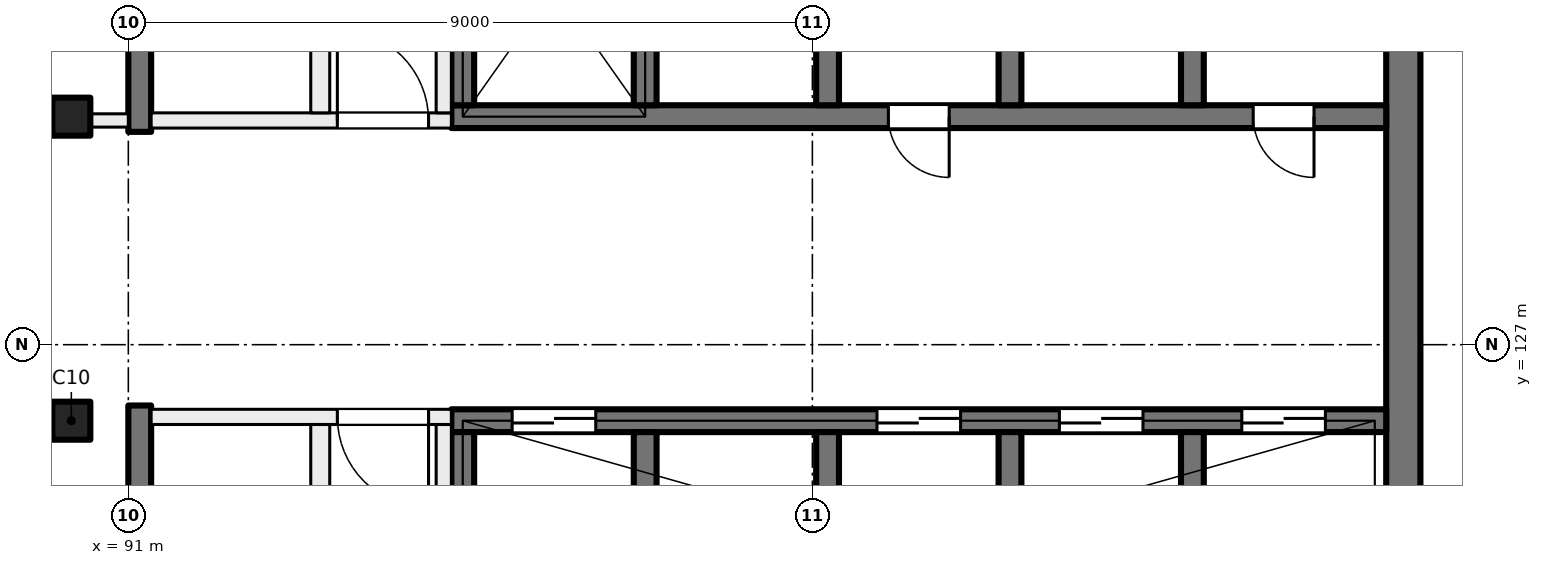
"""IFC4 building model, lengths in metres.
Left out: names, types, materials, properties, quantities, classifications, styles, units other than length and angle.
Written with IfcOpenShell. Run it as: python <this file> out.ifc"""

import sys

from ifc_helpers import new_model, si_unit, direction, frame, frame_2d, origin, origin_2d, place, context, subcontext, project, spatial, rectangle, extrude, element, fill, save


model = new_model("IFC4")
c1 = context("Model", 3, precision=1e-05, world=origin(), true_north=direction((0.0, 1.0)))
c2 = subcontext(c1, "Body", "Model", "MODEL_VIEW")
j1 = project(units=[si_unit("LENGTHUNIT", "METRE"), si_unit("PLANEANGLEUNIT", "RADIAN")], contexts=[c1])
p1 = place(None, origin())
s1 = spatial("IfcSite", under=j1, at=p1, CompositionType="ELEMENT")
p2 = place(p1, origin())
s2 = spatial("IfcBuilding", under=s1, at=p2, CompositionType="ELEMENT")
p3 = place(p2, frame((0.0, 0.0, 269.5)))
s3 = spatial("IfcBuildingStorey", under=s2, at=p3, CompositionType="ELEMENT", Elevation=269.5)
for number, where, z_axis, x_axis in (
    (1, (90.25, 130.0, 0.0), (0.0, 0.0, 1.0), (1.0, 0.0, 0.0)),
    (2, (90.25, 126.0, 0.0), (0.0, 0.0, 1.0), (1.0, 0.0, 0.0)),
):
    element("IfcColumn", number, at=place(p3, frame(where, z_axis=z_axis, x_axis=x_axis)), inside=s3, PredefinedType="COLUMN", context=c2, shape_type="SweptSolid", body=[
        extrude(rectangle(XDim=0.5, YDim=0.5, at=origin_2d()), origin(), (0.0, 0.0, 1.0), 4.0),
    ])
p4 = place(p3, frame((107.775, 135.2, 0.0), z_axis=(0.0, 0.0, 1.0), x_axis=(0.0, -1.0, 0.0)))
e3 = element("IfcWall", 3, at=p4, inside=s3, PredefinedType="SHEAR", context=c2, shape_type="SweptSolid", body=[
    extrude(rectangle(XDim=14.4, YDim=0.45, at=frame_2d((7.2, 0.0))), origin(), (0.0, 0.0, 1.0), 4.0),
])
p5 = place(p3, frame((107.55, 130.0, 0.0), z_axis=(0.0, 0.0, 1.0), x_axis=(-1.0, 0.0, 0.0)))
e4 = element("IfcWall", 4, at=p5, inside=s3, PredefinedType="SHEAR", context=c2, shape_type="SweptSolid", body=[
    extrude(rectangle(XDim=12.3, YDim=0.3, at=frame_2d((6.15, 0.0))), origin(), (0.0, 0.0, 1.0), 4.0),
])
p6 = place(p5, frame((0.95, 0.0, 0.0)))
e5 = element("IfcOpeningElement", 5, at=p6, cuts=e4, PredefinedType="OPENING", context=c2, shape_type="SweptSolid", body=[
    extrude(rectangle(XDim=0.8, YDim=2.1, at=frame_2d((0.4, 1.05))), frame((0.0, 0.16, 0.0), z_axis=(0.0, -1.0, 0.0), x_axis=(1.0, 0.0, 0.0)), (0.0, 0.0, 1.0), 0.32),
])
p7 = place(p5, frame((5.75, 0.0, 0.0)))
e6 = element("IfcOpeningElement", 6, at=p7, cuts=e4, PredefinedType="OPENING", context=c2, shape_type="SweptSolid", body=[
    extrude(rectangle(XDim=0.8, YDim=2.1, at=frame_2d((0.4, 1.05))), frame((0.0, 0.16, 0.0), z_axis=(0.0, -1.0, 0.0), x_axis=(1.0, 0.0, 0.0)), (0.0, 0.0, 1.0), 0.32),
])
for number, where, z_axis, x_axis in (
    (7, (105.0, 133.25, 0.0), (0.0, 0.0, 1.0), (0.0, -1.0, 0.0)),
    (8, (102.6, 133.25, 0.0), (0.0, 0.0, 1.0), (0.0, -1.0, 0.0)),
    (9, (100.2, 133.25, 0.0), (0.0, 0.0, 1.0), (0.0, -1.0, 0.0)),
    (10, (97.8, 133.25, 0.0), (0.0, 0.0, 1.0), (0.0, -1.0, 0.0)),
    (11, (95.4, 133.25, 0.0), (0.0, 0.0, 1.0), (0.0, -1.0, 0.0)),
):
    element("IfcWall", number, at=place(p3, frame(where, z_axis=z_axis, x_axis=x_axis)), inside=s3, PredefinedType="SHEAR", context=c2, shape_type="SweptSolid", body=[
        extrude(rectangle(XDim=3.1, YDim=0.3, at=frame_2d((1.55, 0.0))), origin(), (0.0, 0.0, 1.0), 4.0),
    ])
p8 = place(p3, frame((107.55, 126.0, 0.0), z_axis=(0.0, 0.0, 1.0), x_axis=(-1.0, 0.0, 0.0)))
e12 = element("IfcWall", 12, at=p8, inside=s3, PredefinedType="SHEAR", context=c2, shape_type="SweptSolid", body=[
    extrude(rectangle(XDim=12.3, YDim=0.3, at=frame_2d((6.15, 0.0))), origin(), (0.0, 0.0, 1.0), 4.0),
])
p9 = place(p8, frame((0.8, 0.0, 0.0)))
e13 = element("IfcOpeningElement", 13, at=p9, cuts=e12, PredefinedType="OPENING", context=c2, shape_type="SweptSolid", body=[
    extrude(rectangle(XDim=1.1, YDim=2.1, at=frame_2d((0.55, 1.05))), frame((0.0, 0.16, 0.0), z_axis=(0.0, -1.0, 0.0), x_axis=(1.0, 0.0, 0.0)), (0.0, 0.0, 1.0), 0.32),
])
p10 = place(p8, frame((3.2, 0.0, 0.0)))
e14 = element("IfcOpeningElement", 14, at=p10, cuts=e12, PredefinedType="OPENING", context=c2, shape_type="SweptSolid", body=[
    extrude(rectangle(XDim=1.1, YDim=2.1, at=frame_2d((0.55, 1.05))), frame((0.0, 0.16, 0.0), z_axis=(0.0, -1.0, 0.0), x_axis=(1.0, 0.0, 0.0)), (0.0, 0.0, 1.0), 0.32),
])
p11 = place(p8, frame((5.6, 0.0, 0.0)))
e15 = element("IfcOpeningElement", 15, at=p11, cuts=e12, PredefinedType="OPENING", context=c2, shape_type="SweptSolid", body=[
    extrude(rectangle(XDim=1.1, YDim=2.1, at=frame_2d((0.55, 1.05))), frame((0.0, 0.16, 0.0), z_axis=(0.0, -1.0, 0.0), x_axis=(1.0, 0.0, 0.0)), (0.0, 0.0, 1.0), 0.32),
])
p12 = place(p8, frame((10.4, 0.0, 0.0)))
e16 = element("IfcOpeningElement", 16, at=p12, cuts=e12, PredefinedType="OPENING", context=c2, shape_type="SweptSolid", body=[
    extrude(rectangle(XDim=1.1, YDim=2.1, at=frame_2d((0.55, 1.05))), frame((0.0, 0.16, 0.0), z_axis=(0.0, -1.0, 0.0), x_axis=(1.0, 0.0, 0.0)), (0.0, 0.0, 1.0), 0.32),
])
for number, where, z_axis, x_axis in (
    (17, (105.0, 125.85, 0.0), (0.0, 0.0, 1.0), (0.0, -1.0, 0.0)),
    (18, (102.6, 125.85, 0.0), (0.0, 0.0, 1.0), (0.0, -1.0, 0.0)),
    (19, (100.2, 125.85, 0.0), (0.0, 0.0, 1.0), (0.0, -1.0, 0.0)),
    (20, (97.8, 125.85, 0.0), (0.0, 0.0, 1.0), (0.0, -1.0, 0.0)),
    (21, (95.4, 125.85, 0.0), (0.0, 0.0, 1.0), (0.0, -1.0, 0.0)),
):
    element("IfcWall", number, at=place(p3, frame(where, z_axis=z_axis, x_axis=x_axis)), inside=s3, PredefinedType="SHEAR", context=c2, shape_type="SweptSolid", body=[
        extrude(rectangle(XDim=3.1, YDim=0.3, at=frame_2d((1.55, 0.0))), origin(), (0.0, 0.0, 1.0), 4.0),
    ])
for number, where, z_axis, x_axis in (
    (22, (91.15, 138.55, 0.0), (0.0, 0.0, 1.0), (0.0, -1.0, 0.0)),
    (23, (91.15, 126.2, 0.0), (0.0, 0.0, 1.0), (0.0, -1.0, 0.0)),
):
    element("IfcWall", number, at=place(p3, frame(where, z_axis=z_axis, x_axis=x_axis)), inside=s3, PredefinedType="SHEAR", context=c2, shape_type="SweptSolid", body=[
        extrude(rectangle(XDim=8.75, YDim=0.3, at=frame_2d((4.375, 0.0))), origin(), (0.0, 0.0, 1.0), 4.0),
    ])
p13 = place(p3, frame((95.25, 126.05, 0.0), z_axis=(0.0, 0.0, 1.0), x_axis=(-1.0, 0.0, 0.0)))
e24 = element("IfcWall", 24, at=p13, inside=s3, PredefinedType="PARTITIONING", context=c2, shape_type="SweptSolid", body=[
    extrude(rectangle(XDim=3.95, YDim=0.2, at=frame_2d((1.975, 0.0))), origin(), (0.0, 0.0, 1.0), 3.625),
])
p14 = place(p13, frame((0.3, 0.0, 0.0)))
e25 = element("IfcOpeningElement", 25, at=p14, cuts=e24, PredefinedType="OPENING", context=c2, shape_type="SweptSolid", body=[
    extrude(rectangle(XDim=1.2, YDim=2.1, at=frame_2d((0.6, 1.05))), frame((0.0, 0.11, 0.0), z_axis=(0.0, -1.0, 0.0), x_axis=(1.0, 0.0, 0.0)), (0.0, 0.0, 1.0), 0.22),
])
p15 = place(p3, frame((95.15, 117.45, 0.0), z_axis=(0.0, 0.0, 1.0), x_axis=(0.0, 1.0, 0.0)))
e26 = element("IfcWall", 26, at=p15, inside=s3, PredefinedType="PARTITIONING", context=c2, shape_type="SweptSolid", body=[
    extrude(rectangle(XDim=8.5, YDim=0.2, at=frame_2d((4.25, 0.0))), origin(), (0.0, 0.0, 1.0), 3.625),
])
p16 = place(p15, frame((1.75, 0.0, 0.0)))
e27 = element("IfcOpeningElement", 27, at=p16, cuts=e26, PredefinedType="OPENING", context=c2, shape_type="SweptSolid", body=[
    extrude(rectangle(XDim=1.5, YDim=2.1, at=frame_2d((0.75, 1.05))), frame((0.0, 0.11, 0.0), z_axis=(0.0, -1.0, 0.0), x_axis=(1.0, 0.0, 0.0)), (0.0, 0.0, 1.0), 0.22),
])
p17 = place(p3, frame((93.525, 117.45, 0.0), z_axis=(0.0, 0.0, 1.0), x_axis=(0.0, 1.0, 0.0)))
e28 = element("IfcWall", 28, at=p17, inside=s3, PredefinedType="PARTITIONING", context=c2, shape_type="SweptSolid", body=[
    extrude(rectangle(XDim=8.5, YDim=0.25, at=frame_2d((4.25, 0.0))), origin(), (0.0, 0.0, 1.0), 3.625),
])
p18 = place(p17, frame((6.0, 0.0, 0.0)))
e29 = element("IfcOpeningElement", 29, at=p18, cuts=e28, PredefinedType="OPENING", context=c2, shape_type="SweptSolid", body=[
    extrude(rectangle(XDim=0.8, YDim=2.1, at=frame_2d((0.4, 1.05))), frame((0.0, 0.135, 0.0), z_axis=(0.0, -1.0, 0.0), x_axis=(1.0, 0.0, 0.0)), (0.0, 0.0, 1.0), 0.27),
])
p19 = place(p17, frame((1.7, 0.0, 0.0)))
e30 = element("IfcOpeningElement", 30, at=p19, cuts=e28, PredefinedType="OPENING", context=c2, shape_type="SweptSolid", body=[
    extrude(rectangle(XDim=0.8, YDim=2.1, at=frame_2d((0.4, 1.05))), frame((0.0, 0.135, 0.0), z_axis=(0.0, -1.0, 0.0), x_axis=(1.0, 0.0, 0.0)), (0.0, 0.0, 1.0), 0.27),
])
p20 = place(p3, frame((91.3, 129.95, 0.0), z_axis=(0.0, 0.0, 1.0), x_axis=(1.0, 0.0, 0.0)))
e31 = element("IfcWall", 31, at=p20, inside=s3, PredefinedType="PARTITIONING", context=c2, shape_type="SweptSolid", body=[
    extrude(rectangle(XDim=3.95, YDim=0.2, at=frame_2d((1.975, 0.0))), origin(), (0.0, 0.0, 1.0), 3.625),
])
p21 = place(p20, frame((2.45, 0.0, 0.0)))
e32 = element("IfcOpeningElement", 32, at=p21, cuts=e31, PredefinedType="OPENING", context=c2, shape_type="SweptSolid", body=[
    extrude(rectangle(XDim=1.2, YDim=2.1, at=frame_2d((0.6, 1.05))), frame((0.0, 0.11, 0.0), z_axis=(0.0, -1.0, 0.0), x_axis=(1.0, 0.0, 0.0)), (0.0, 0.0, 1.0), 0.22),
])
p22 = place(p3, frame((95.15, 130.05, 0.0), z_axis=(0.0, 0.0, 1.0), x_axis=(0.0, 1.0, 0.0)))
e33 = element("IfcWall", 33, at=p22, inside=s3, PredefinedType="PARTITIONING", context=c2, shape_type="SweptSolid", body=[
    extrude(rectangle(XDim=8.5, YDim=0.2, at=frame_2d((4.25, 0.0))), origin(), (0.0, 0.0, 1.0), 3.625),
])
p23 = place(p22, frame((5.25, 0.0, 0.0)))
e34 = element("IfcOpeningElement", 34, at=p23, cuts=e33, PredefinedType="OPENING", context=c2, shape_type="SweptSolid", body=[
    extrude(rectangle(XDim=1.5, YDim=2.1, at=frame_2d((0.75, 1.05))), frame((0.0, 0.11, 0.0), z_axis=(0.0, -1.0, 0.0), x_axis=(1.0, 0.0, 0.0)), (0.0, 0.0, 1.0), 0.22),
])
p24 = place(p3, frame((93.525, 130.05, 0.0), z_axis=(0.0, 0.0, 1.0), x_axis=(0.0, 1.0, 0.0)))
e35 = element("IfcWall", 35, at=p24, inside=s3, PredefinedType="PARTITIONING", context=c2, shape_type="SweptSolid", body=[
    extrude(rectangle(XDim=8.5, YDim=0.25, at=frame_2d((4.25, 0.0))), origin(), (0.0, 0.0, 1.0), 3.625),
])
p25 = place(p24, frame((0.99, 0.0, 0.0)))
e36 = element("IfcOpeningElement", 36, at=p25, cuts=e35, PredefinedType="OPENING", context=c2, shape_type="SweptSolid", body=[
    extrude(rectangle(XDim=0.8, YDim=2.1, at=frame_2d((0.4, 1.05))), frame((0.0, 0.135, 0.0), z_axis=(0.0, -1.0, 0.0), x_axis=(1.0, 0.0, 0.0)), (0.0, 0.0, 1.0), 0.27),
])
p26 = place(p24, frame((5.29, 0.0, 0.0)))
e37 = element("IfcOpeningElement", 37, at=p26, cuts=e35, PredefinedType="OPENING", context=c2, shape_type="SweptSolid", body=[
    extrude(rectangle(XDim=0.8, YDim=2.1, at=frame_2d((0.4, 1.05))), frame((0.0, 0.135, 0.0), z_axis=(0.0, -1.0, 0.0), x_axis=(1.0, 0.0, 0.0)), (0.0, 0.0, 1.0), 0.27),
])
p27 = place(p3, frame((85.838, 129.95, 0.0), z_axis=(0.0, 0.0, 1.0), x_axis=(1.0, 0.0, 0.0)))
e38 = element("IfcWall", 38, at=p27, inside=s3, PredefinedType="PARTITIONING", context=c2, shape_type="SweptSolid", body=[
    extrude(rectangle(XDim=5.162, YDim=0.175, at=frame_2d((2.581, 0.0))), origin(), (0.0, 0.0, 1.0), 3.625),
])
p28 = place(p27, frame((1.971, 0.0, 0.0)))
e39 = element("IfcOpeningElement", 39, at=p28, cuts=e38, PredefinedType="OPENING", context=c2, shape_type="SweptSolid", body=[
    extrude(rectangle(XDim=1.2, YDim=2.1, at=frame_2d((0.6, 1.05))), frame((0.0, 0.097, 0.0), z_axis=(0.0, -1.0, 0.0), x_axis=(1.0, 0.0, 0.0)), (0.0, 0.0, 1.0), 0.195),
])
p29 = place(p9, origin())
e40 = element("IfcDoor", 40, at=p29, inside=s3, OperationType="DOUBLE_DOOR_SLIDING", PredefinedType="DOOR", context=c2, shape_type="SweptSolid", body=[
    extrude(rectangle(XDim=1.1, YDim=2.1, at=frame_2d((0.55, 1.05))), frame((0.0, 0.025, 0.0), z_axis=(0.0, -1.0, 0.0), x_axis=(1.0, 0.0, 0.0)), (0.0, 0.0, 1.0), 0.05),
])
fill(e13, e40)
p30 = place(p10, origin())
e41 = element("IfcDoor", 41, at=p30, inside=s3, OperationType="DOUBLE_DOOR_SLIDING", PredefinedType="DOOR", context=c2, shape_type="SweptSolid", body=[
    extrude(rectangle(XDim=1.1, YDim=2.1, at=frame_2d((0.55, 1.05))), frame((0.0, 0.025, 0.0), z_axis=(0.0, -1.0, 0.0), x_axis=(1.0, 0.0, 0.0)), (0.0, 0.0, 1.0), 0.05),
])
fill(e14, e41)
p31 = place(p11, origin())
e42 = element("IfcDoor", 42, at=p31, inside=s3, OperationType="DOUBLE_DOOR_SLIDING", PredefinedType="DOOR", context=c2, shape_type="SweptSolid", body=[
    extrude(rectangle(XDim=1.1, YDim=2.1, at=frame_2d((0.55, 1.05))), frame((0.0, 0.025, 0.0), z_axis=(0.0, -1.0, 0.0), x_axis=(1.0, 0.0, 0.0)), (0.0, 0.0, 1.0), 0.05),
])
fill(e15, e42)
p32 = place(p12, origin())
e43 = element("IfcDoor", 43, at=p32, inside=s3, OperationType="DOUBLE_DOOR_SLIDING", PredefinedType="DOOR", context=c2, shape_type="SweptSolid", body=[
    extrude(rectangle(XDim=1.1, YDim=2.1, at=frame_2d((0.55, 1.05))), frame((0.0, 0.025, 0.0), z_axis=(0.0, -1.0, 0.0), x_axis=(1.0, 0.0, 0.0)), (0.0, 0.0, 1.0), 0.05),
])
fill(e16, e43)
p33 = place(p6, origin())
e44 = element("IfcDoor", 44, at=p33, inside=s3, OperationType="SINGLE_SWING_LEFT", PredefinedType="DOOR", context=c2, shape_type="SweptSolid", body=[
    extrude(rectangle(XDim=0.8, YDim=2.1, at=frame_2d((0.4, 1.05))), frame((0.0, 0.025, 0.0), z_axis=(0.0, -1.0, 0.0), x_axis=(1.0, 0.0, 0.0)), (0.0, 0.0, 1.0), 0.05),
])
fill(e5, e44)
p34 = place(p7, origin())
e45 = element("IfcDoor", 45, at=p34, inside=s3, OperationType="SINGLE_SWING_RIGHT", PredefinedType="DOOR", context=c2, shape_type="SweptSolid", body=[
    extrude(rectangle(XDim=0.8, YDim=2.1, at=frame_2d((0.4, 1.05))), frame((0.0, 0.025, 0.0), z_axis=(0.0, -1.0, 0.0), x_axis=(1.0, 0.0, 0.0)), (0.0, 0.0, 1.0), 0.05),
])
fill(e6, e45)
p35 = place(p14, origin())
e46 = element("IfcDoor", 46, at=p35, inside=s3, OperationType="DOUBLE_DOOR_SINGLE_SWING", PredefinedType="DOOR", context=c2, shape_type="SweptSolid", body=[
    extrude(rectangle(XDim=1.2, YDim=2.1, at=frame_2d((0.6, 1.05))), frame((0.0, 0.025, 0.0), z_axis=(0.0, -1.0, 0.0), x_axis=(1.0, 0.0, 0.0)), (0.0, 0.0, 1.0), 0.05),
])
fill(e25, e46)
p36 = place(p21, origin())
e47 = element("IfcDoor", 47, at=p36, inside=s3, OperationType="DOUBLE_DOOR_SINGLE_SWING", PredefinedType="DOOR", context=c2, shape_type="SweptSolid", body=[
    extrude(rectangle(XDim=1.2, YDim=2.1, at=frame_2d((0.6, 1.05))), frame((0.0, 0.025, 0.0), z_axis=(0.0, -1.0, 0.0), x_axis=(1.0, 0.0, 0.0)), (0.0, 0.0, 1.0), 0.05),
])
fill(e32, e47)
save(model, sys.argv[1])
